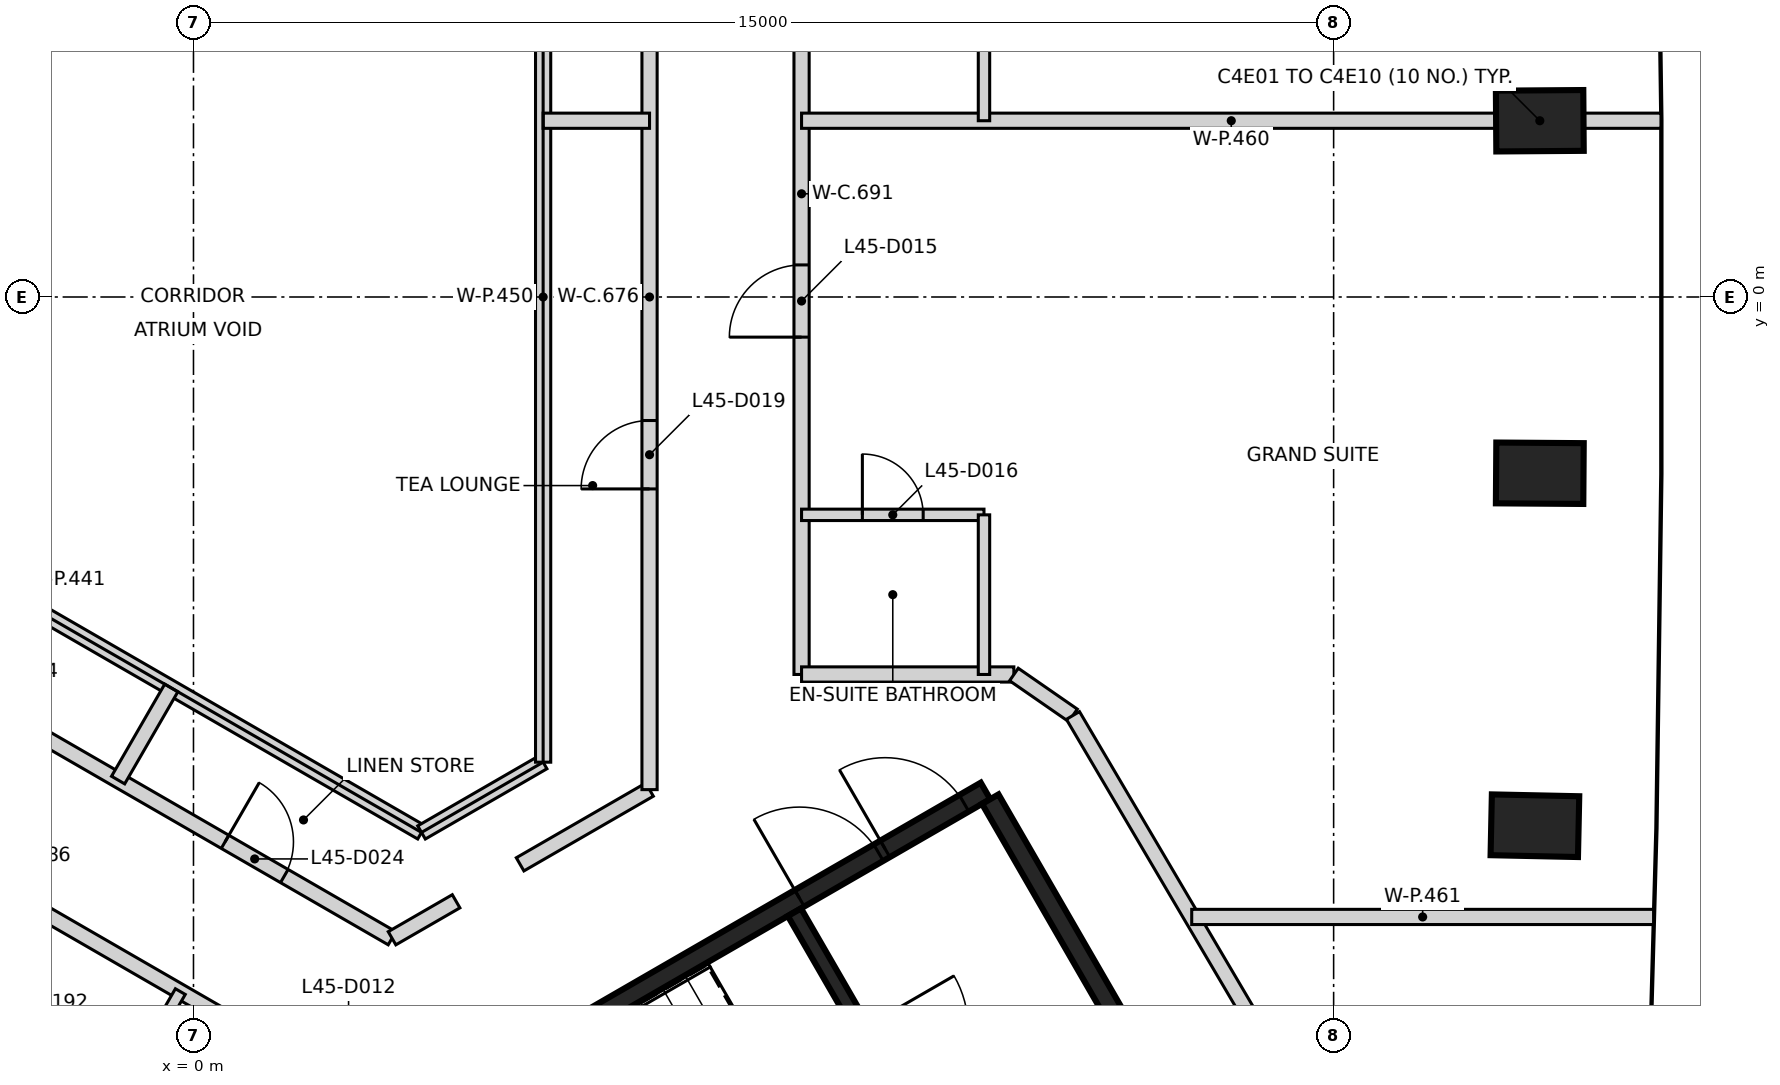
"""IFC4 building model, lengths in metres.
Left out: names, types, materials, properties, quantities, classifications, styles, units other than length and angle.
Written with IfcOpenShell. Run it as: python <this file> out.ifc"""

import sys

from ifc_helpers import new_model, si_unit, direction, frame, frame_2d, origin, origin_2d, place, context, subcontext, project, spatial, rectangle, extrude, element, fill, save


model = new_model("IFC4")
c1 = context("Model", 3, precision=1e-05, world=origin(), true_north=direction((0.0, 1.0)))
c2 = subcontext(c1, "Body", "Model", "MODEL_VIEW")
j1 = project(units=[si_unit("LENGTHUNIT", "METRE"), si_unit("PLANEANGLEUNIT", "RADIAN")], contexts=[c1])
p1 = place(None, origin())
s1 = spatial("IfcSite", under=j1, at=p1, CompositionType="ELEMENT")
p2 = place(p1, origin())
s2 = spatial("IfcBuilding", under=s1, at=p2, CompositionType="ELEMENT")
p3 = place(p2, frame((0.0, 0.0, 182.8)))
s3 = spatial("IfcBuildingStorey", under=s2, at=p3, CompositionType="ELEMENT", Elevation=182.8)
for number, where, z_axis, x_axis in (
    (1, (17.648, -6.956, -0.35), (0.0, 0.0, 1.0), (-1.0, 0.021, 0.0)),
    (2, (17.712, -2.319, -0.35), (0.0, 0.0, 1.0), (-1.0, 0.007, 0.0)),
    (3, (17.712, 2.319, -0.35), (0.0, 0.0, 1.0), (1.0, 0.007, 0.0)),
):
    element("IfcColumn", number, at=place(p3, frame(where, z_axis=z_axis, x_axis=x_axis)), inside=s3, PredefinedType="COLUMN", context=c2, shape_type="SweptSolid", body=[
        extrude(rectangle(XDim=1.15, YDim=0.8, at=origin_2d()), origin(), (0.0, 0.0, 1.0), 3.6),
    ])
p4 = place(p3, frame((0.417, -12.273, 0.0), z_axis=(0.0, 0.0, 1.0), x_axis=(0.866021906294, 0.500006057782, 0.0)))
e4 = element("IfcWall", 4, at=p4, inside=s3, PredefinedType="SHEAR", context=c2, shape_type="SweptSolid", body=[
    extrude(rectangle(XDim=11.55, YDim=0.25, at=frame_2d((5.775, 0.0))), origin(), (0.0, 0.0, 1.0), 3.25),
])
p5 = place(p4, frame((10.025, 0.0, 0.0)))
e5 = element("IfcOpeningElement", 5, at=p5, cuts=e4, PredefinedType="OPENING", context=c2, shape_type="SweptSolid", body=[
    extrude(rectangle(XDim=1.2, YDim=2.1, at=frame_2d((0.6, 1.05))), frame((0.0, 0.135, 0.0), z_axis=(0.0, -1.0, 0.0), x_axis=(1.0, 0.0, 0.0)), (0.0, 0.0, 1.0), 0.27),
])
p6 = place(p4, frame((8.725, 0.0, 0.0)))
e6 = element("IfcOpeningElement", 6, at=p6, cuts=e4, PredefinedType="OPENING", context=c2, shape_type="SweptSolid", body=[
    extrude(rectangle(XDim=1.2, YDim=2.1, at=frame_2d((0.6, 1.05))), frame((0.0, 0.135, 0.0), z_axis=(0.0, -1.0, 0.0), x_axis=(1.0, 0.0, 0.0)), (0.0, 0.0, 1.0), 0.27),
])
p7 = place(p3, frame((10.483, -6.606, 0.0), z_axis=(0.0, 0.0, 1.0), x_axis=(0.49999885962, -0.866026062182, 0.0)))
e7 = element("IfcWall", 7, at=p7, inside=s3, PredefinedType="SHEAR", context=c2, shape_type="SweptSolid", body=[
    extrude(rectangle(XDim=5.225, YDim=0.25, at=frame_2d((2.612, 0.0))), origin(), (0.0, 0.0, 1.0), 3.25),
])
p8 = place(p3, frame((7.906, -8.094, 0.0), z_axis=(0.0, 0.0, 1.0), x_axis=(0.500027839223, -0.866009330205, 0.0)))
e8 = element("IfcWall", 8, at=p8, inside=s3, PredefinedType="SHEAR", context=c2, shape_type="SweptSolid", body=[
    extrude(rectangle(XDim=5.098, YDim=0.2, at=frame_2d((2.549, 0.0))), origin(), (0.0, 0.0, 1.0), 3.25),
])
p9 = place(p8, frame((1.774, 0.0, 0.0)))
e9 = element("IfcOpeningElement", 9, at=p9, cuts=e8, PredefinedType="OPENING", context=c2, shape_type="SweptSolid", body=[
    extrude(rectangle(XDim=1.4, YDim=2.1, at=frame_2d((0.7, 1.05))), frame((0.0, 0.11, 0.0), z_axis=(0.0, -1.0, 0.0), x_axis=(1.0, 0.0, 0.0)), (0.0, 0.0, 1.0), 0.22),
])
p10 = place(p3, frame((-10.652, 3.087, 0.0), z_axis=(0.0, 0.0, 1.0), x_axis=(0.866016136997, 0.500016050204, 0.0)))
e10 = element("IfcWall", 10, at=p10, inside=s3, PredefinedType="PARTITIONING", context=c2, shape_type="SweptSolid", body=[
    extrude(rectangle(XDim=12.645, YDim=0.2, at=frame_2d((6.322, 0.0))), origin(), (0.0, 0.0, 1.0), 3.25),
])
p11 = place(p10, frame((10.817, 0.0, 0.0)))
e11 = element("IfcOpeningElement", 11, at=p11, cuts=e10, PredefinedType="OPENING", context=c2, shape_type="SweptSolid", body=[
    extrude(rectangle(XDim=1.0, YDim=2.1, at=frame_2d((0.5, 1.05))), frame((0.0, 0.11, 0.0), z_axis=(0.0, -1.0, 0.0), x_axis=(1.0, 0.0, 0.0)), (0.0, 0.0, 1.0), 0.22),
])
p12 = place(p10, frame((7.182, 0.0, 0.0)))
e12 = element("IfcOpeningElement", 12, at=p12, cuts=e10, PredefinedType="OPENING", context=c2, shape_type="SweptSolid", body=[
    extrude(rectangle(XDim=1.0, YDim=2.1, at=frame_2d((0.5, 1.05))), frame((0.0, 0.11, 0.0), z_axis=(0.0, -1.0, 0.0), x_axis=(1.0, 0.0, 0.0)), (0.0, 0.0, 1.0), 0.22),
])
p13 = place(p10, frame((2.153, 0.0, 0.0)))
e13 = element("IfcOpeningElement", 13, at=p13, cuts=e10, PredefinedType="OPENING", context=c2, shape_type="SweptSolid", body=[
    extrude(rectangle(XDim=1.0, YDim=2.1, at=frame_2d((0.5, 1.05))), frame((0.0, 0.11, 0.0), z_axis=(0.0, -1.0, 0.0), x_axis=(1.0, 0.0, 0.0)), (0.0, 0.0, 1.0), 0.22),
])
p14 = place(p3, frame((-8.612, 1.956, 0.0), z_axis=(0.0, 0.0, 1.0), x_axis=(0.866034386606, 0.499984440973, 0.0)))
e14 = element("IfcWall", 14, at=p14, inside=s3, PredefinedType="PARTITIONING", context=c2, shape_type="SweptSolid", body=[
    extrude(rectangle(XDim=12.96, YDim=0.2, at=frame_2d((6.48, 0.0))), origin(), (0.0, 0.0, 1.0), 3.25),
])
p15 = place(p14, frame((8.105, 0.0, 0.0)))
e15 = element("IfcOpeningElement", 15, at=p15, cuts=e14, PredefinedType="OPENING", context=c2, shape_type="SweptSolid", body=[
    extrude(rectangle(XDim=0.9, YDim=2.1, at=frame_2d((0.45, 1.05))), frame((0.0, 0.11, 0.0), z_axis=(0.0, -1.0, 0.0), x_axis=(1.0, 0.0, 0.0)), (0.0, 0.0, 1.0), 0.22),
])
p16 = place(p14, frame((1.637, 0.0, 0.0)))
e16 = element("IfcOpeningElement", 16, at=p16, cuts=e14, PredefinedType="OPENING", context=c2, shape_type="SweptSolid", body=[
    extrude(rectangle(XDim=0.9, YDim=2.1, at=frame_2d((0.45, 1.05))), frame((0.0, 0.11, 0.0), z_axis=(0.0, -1.0, 0.0), x_axis=(1.0, 0.0, 0.0)), (0.0, 0.0, 1.0), 0.22),
])
p17 = place(p3, frame((-8.612, -1.956, 0.0), z_axis=(0.0, 0.0, 1.0), x_axis=(0.866034386606, -0.499984440973, 0.0)))
e17 = element("IfcWall", 17, at=p17, inside=s3, PredefinedType="PARTITIONING", context=c2, shape_type="SweptSolid", body=[
    extrude(rectangle(XDim=12.96, YDim=0.2, at=frame_2d((6.48, 0.0))), origin(), (0.0, 0.0, 1.0), 3.25),
])
p18 = place(p17, frame((3.955, 0.0, 0.0)))
e18 = element("IfcOpeningElement", 18, at=p18, cuts=e17, PredefinedType="OPENING", context=c2, shape_type="SweptSolid", body=[
    extrude(rectangle(XDim=0.9, YDim=2.1, at=frame_2d((0.45, 1.05))), frame((0.0, 0.11, 0.0), z_axis=(0.0, -1.0, 0.0), x_axis=(1.0, 0.0, 0.0)), (0.0, 0.0, 1.0), 0.22),
])
p19 = place(p17, frame((10.424, 0.0, 0.0)))
e19 = element("IfcOpeningElement", 19, at=p19, cuts=e17, PredefinedType="OPENING", context=c2, shape_type="SweptSolid", body=[
    extrude(rectangle(XDim=0.9, YDim=2.1, at=frame_2d((0.45, 1.05))), frame((0.0, 0.11, 0.0), z_axis=(0.0, -1.0, 0.0), x_axis=(1.0, 0.0, 0.0)), (0.0, 0.0, 1.0), 0.22),
])
p20 = place(p3, frame((-8.301, -4.445, 0.0), z_axis=(0.0, 0.0, 1.0), x_axis=(0.865969859016, -0.500096194023, 0.0)))
e20 = element("IfcWall", 20, at=p20, inside=s3, PredefinedType="PARTITIONING", context=c2, shape_type="SweptSolid", body=[
    extrude(rectangle(XDim=12.647, YDim=0.2, at=frame_2d((6.323, 0.0))), origin(), (0.0, 0.0, 1.0), 3.25),
])
p21 = place(p20, frame((2.836, 0.0, 0.0)))
e21 = element("IfcOpeningElement", 21, at=p21, cuts=e20, PredefinedType="OPENING", context=c2, shape_type="SweptSolid", body=[
    extrude(rectangle(XDim=0.95, YDim=2.1, at=frame_2d((0.475, 1.05))), frame((0.0, 0.11, 0.0), z_axis=(0.0, -1.0, 0.0), x_axis=(1.0, 0.0, 0.0)), (0.0, 0.0, 1.0), 0.22),
])
p22 = place(p20, frame((11.467, 0.0, 0.0)))
e22 = element("IfcOpeningElement", 22, at=p22, cuts=e20, PredefinedType="OPENING", context=c2, shape_type="SweptSolid", body=[
    extrude(rectangle(XDim=0.95, YDim=2.1, at=frame_2d((0.475, 1.05))), frame((0.0, 0.11, 0.0), z_axis=(0.0, -1.0, 0.0), x_axis=(1.0, 0.0, 0.0)), (0.0, 0.0, 1.0), 0.22),
])
p23 = place(p3, frame((2.612, -8.437, 0.0), z_axis=(0.0, 0.0, 1.0), x_axis=(0.866026830048, 0.499997529631, 0.0)))
e23 = element("IfcWall", 23, at=p23, inside=s3, PredefinedType="PARTITIONING", context=c2, shape_type="SweptSolid", body=[
    extrude(rectangle(XDim=0.973, YDim=0.2, at=frame_2d((0.487, 0.0))), origin(), (0.0, 0.0, 1.0), 3.25),
])
p24 = place(p3, frame((4.297, -7.464, 0.0), z_axis=(0.0, 0.0, 1.0), x_axis=(0.866026378386, 0.499998311937, 0.0)))
e24 = element("IfcWall", 24, at=p24, inside=s3, PredefinedType="PARTITIONING", context=c2, shape_type="SweptSolid", body=[
    extrude(rectangle(XDim=1.966, YDim=0.2, at=frame_2d((0.983, 0.0))), origin(), (0.0, 0.0, 1.0), 3.25),
])
p25 = place(p3, frame((6.0, -6.481, 0.0), z_axis=(0.0, 0.0, 1.0), x_axis=(0.0, 1.0, 0.0)))
e25 = element("IfcWall", 25, at=p25, inside=s3, PredefinedType="PARTITIONING", context=c2, shape_type="SweptSolid", body=[
    extrude(rectangle(XDim=12.962, YDim=0.2, at=frame_2d((6.481, 0.0))), origin(), (0.0, 0.0, 1.0), 3.25),
])
p26 = place(p25, frame((3.956, 0.0, 0.0)))
e26 = element("IfcOpeningElement", 26, at=p26, cuts=e25, PredefinedType="OPENING", context=c2, shape_type="SweptSolid", body=[
    extrude(rectangle(XDim=0.9, YDim=2.1, at=frame_2d((0.45, 1.05))), frame((0.0, 0.11, 0.0), z_axis=(0.0, -1.0, 0.0), x_axis=(1.0, 0.0, 0.0)), (0.0, 0.0, 1.0), 0.22),
])
p27 = place(p25, frame((10.425, 0.0, 0.0)))
e27 = element("IfcOpeningElement", 27, at=p27, cuts=e25, PredefinedType="OPENING", context=c2, shape_type="SweptSolid", body=[
    extrude(rectangle(XDim=0.9, YDim=2.1, at=frame_2d((0.45, 1.05))), frame((0.0, 0.11, 0.0), z_axis=(0.0, -1.0, 0.0), x_axis=(1.0, 0.0, 0.0)), (0.0, 0.0, 1.0), 0.22),
])
p28 = place(p3, frame((8.0, -4.966, 0.0), z_axis=(0.0, 0.0, 1.0), x_axis=(0.0, 1.0, 0.0)))
e28 = element("IfcWall", 28, at=p28, inside=s3, PredefinedType="PARTITIONING", context=c2, shape_type="SweptSolid", body=[
    extrude(rectangle(XDim=12.647, YDim=0.2, at=frame_2d((6.324, 0.0))), origin(), (0.0, 0.0, 1.0), 3.25),
])
p29 = place(p28, frame((4.438, 0.0, 0.0)))
e29 = element("IfcOpeningElement", 29, at=p29, cuts=e28, PredefinedType="OPENING", context=c2, shape_type="SweptSolid", body=[
    extrude(rectangle(XDim=0.95, YDim=2.1, at=frame_2d((0.475, 1.05))), frame((0.0, 0.11, 0.0), z_axis=(0.0, -1.0, 0.0), x_axis=(1.0, 0.0, 0.0)), (0.0, 0.0, 1.0), 0.22),
])
p30 = place(p28, frame((11.466, 0.0, 0.0)))
e30 = element("IfcOpeningElement", 30, at=p30, cuts=e28, PredefinedType="OPENING", context=c2, shape_type="SweptSolid", body=[
    extrude(rectangle(XDim=0.95, YDim=2.1, at=frame_2d((0.475, 1.05))), frame((0.0, 0.11, 0.0), z_axis=(0.0, -1.0, 0.0), x_axis=(1.0, 0.0, 0.0)), (0.0, 0.0, 1.0), 0.22),
])
p31 = place(p3, frame((8.0, -4.966, 0.0), z_axis=(0.0, 0.0, 1.0), x_axis=(1.0, 0.0, 0.0)))
e31 = element("IfcWall", 31, at=p31, inside=s3, PredefinedType="PARTITIONING", context=c2, shape_type="SweptSolid", body=[
    extrude(rectangle(XDim=2.793, YDim=0.2, at=frame_2d((1.396, 0.0))), origin(), (0.0, 0.0, 1.0), 3.25),
])
p32 = place(p3, frame((10.794, -4.966, 0.0), z_axis=(0.0, 0.0, 1.0), x_axis=(0.822266583859, -0.569102508401, 0.0)))
e32 = element("IfcWall", 32, at=p32, inside=s3, PredefinedType="PARTITIONING", context=c2, shape_type="SweptSolid", body=[
    extrude(rectangle(XDim=0.945, YDim=0.2, at=frame_2d((0.473, 0.0))), origin(), (0.0, 0.0, 1.0), 3.25),
])
p33 = place(p3, frame((11.571, -5.505, 0.0), z_axis=(0.0, 0.0, 1.0), x_axis=(0.507311705706, -0.861762631618, 0.0)))
e33 = element("IfcWall", 33, at=p33, inside=s3, PredefinedType="PARTITIONING", context=c2, shape_type="SweptSolid", body=[
    extrude(rectangle(XDim=10.391, YDim=0.2, at=frame_2d((5.196, 0.0))), origin(), (0.0, 0.0, 1.0), 3.25),
])
p34 = place(p33, frame((6.228, 0.0, 0.0)))
e34 = element("IfcOpeningElement", 34, at=p34, cuts=e33, PredefinedType="OPENING", context=c2, shape_type="SweptSolid", body=[
    extrude(rectangle(XDim=1.0, YDim=2.1, at=frame_2d((0.5, 1.05))), frame((0.0, 0.11, 0.0), z_axis=(0.0, -1.0, 0.0), x_axis=(1.0, 0.0, 0.0)), (0.0, 0.0, 1.0), 0.22),
])
for number, where, z_axis, x_axis in (
    (35, (-7.6, 0.924, 0.0), (0.0, 0.0, 1.0), (0.866, 0.5, 0.0)),
    (36, (-7.6, -0.924, 0.0), (0.0, 0.0, 1.0), (0.866, -0.5, 0.0)),
):
    element("IfcWall", number, at=place(p3, frame(where, z_axis=z_axis, x_axis=x_axis)), inside=s3, PredefinedType="PARTITIONING", context=c2, shape_type="SweptSolid", body=[
        extrude(rectangle(XDim=12.24, YDim=0.2, at=frame_2d((6.12, 0.0))), origin(), (0.0, 0.0, 1.0), 3.25),
    ])
p35 = place(p3, frame((-0.992, -6.355, 0.0), z_axis=(0.0, 0.0, 1.0), x_axis=(0.500059638837, 0.865990968548, 0.0)))
e37 = element("IfcWall", 37, at=p35, inside=s3, PredefinedType="PARTITIONING", context=c2, shape_type="SweptSolid", body=[
    extrude(rectangle(XDim=1.4, YDim=0.2, at=frame_2d((0.7, 0.0))), origin(), (0.0, 0.0, 1.0), 3.25),
])
p36 = place(p3, frame((3.0, -7.044, 0.0), z_axis=(0.0, 0.0, 1.0), x_axis=(0.865875248522, 0.500259986404, 0.0)))
e38 = element("IfcWall", 38, at=p36, inside=s3, PredefinedType="PARTITIONING", context=c2, shape_type="SweptSolid", body=[
    extrude(rectangle(XDim=1.848, YDim=0.2, at=frame_2d((0.924, 0.0))), origin(), (0.0, 0.0, 1.0), 3.25),
])
p37 = place(p3, frame((4.6, -6.12, 0.0), z_axis=(0.0, 0.0, 1.0), x_axis=(0.0, 1.0, 0.0)))
e39 = element("IfcWall", 39, at=p37, inside=s3, PredefinedType="PARTITIONING", context=c2, shape_type="SweptSolid", body=[
    extrude(rectangle(XDim=12.24, YDim=0.2, at=frame_2d((6.12, 0.0))), origin(), (0.0, 0.0, 1.0), 3.25),
])
p38 = place(p3, frame((4.6, 2.319, 0.0), z_axis=(0.0, 0.0, 1.0), x_axis=(1.0, 0.0, 0.0)))
e40 = element("IfcWall", 40, at=p38, inside=s3, PredefinedType="PARTITIONING", context=c2, shape_type="SweptSolid", body=[
    extrude(rectangle(XDim=1.4, YDim=0.2, at=frame_2d((0.7, 0.0))), origin(), (0.0, 0.0, 1.0), 3.25),
])
p39 = place(p3, frame((8.0, 2.319, 0.0), z_axis=(0.0, 0.0, 1.0), x_axis=(1.0, 0.0, 0.0)))
e41 = element("IfcWall", 41, at=p39, inside=s3, PredefinedType="PARTITIONING", context=c2, shape_type="SweptSolid", body=[
    extrude(rectangle(XDim=11.306, YDim=0.2, at=frame_2d((5.653, 0.0))), origin(), (0.0, 0.0, 1.0), 3.25),
])
p40 = place(p3, frame((13.133, -8.156, 0.0), z_axis=(0.0, 0.0, 1.0), x_axis=(1.0, 0.0, 0.0)))
e42 = element("IfcWall", 42, at=p40, inside=s3, PredefinedType="PARTITIONING", context=c2, shape_type="SweptSolid", body=[
    extrude(rectangle(XDim=6.076, YDim=0.2, at=frame_2d((3.038, 0.0))), origin(), (0.0, 0.0, 1.0), 2.35),
])
p41 = place(p3, frame((-5.011, -9.116, 0.0), z_axis=(0.0, 0.0, 1.0), x_axis=(0.866052994476, -0.499952208475, 0.0)))
e43 = element("IfcWall", 43, at=p41, inside=s3, PredefinedType="PARTITIONING", context=c2, shape_type="SweptSolid", body=[
    extrude(rectangle(XDim=4.201, YDim=0.15, at=frame_2d((2.1, 0.0))), origin(), (0.0, 0.0, 1.0), 3.25),
])
p42 = place(p3, frame((-1.373, -11.216, 0.0), z_axis=(0.0, 0.0, 1.0), x_axis=(0.500045362686, 0.865999212041, 0.0)))
e44 = element("IfcWall", 44, at=p42, inside=s3, PredefinedType="PARTITIONING", context=c2, shape_type="SweptSolid", body=[
    extrude(rectangle(XDim=2.4, YDim=0.15, at=frame_2d((1.2, 0.0))), origin(), (0.0, 0.0, 1.0), 3.25),
])
p43 = place(p42, frame((0.8, 0.0, 0.0)))
e45 = element("IfcOpeningElement", 45, at=p43, cuts=e44, PredefinedType="OPENING", context=c2, shape_type="SweptSolid", body=[
    extrude(rectangle(XDim=0.8, YDim=2.1, at=frame_2d((0.4, 1.05))), frame((0.0, 0.085, 0.0), z_axis=(0.0, -1.0, 0.0), x_axis=(1.0, 0.0, 0.0)), (0.0, 0.0, 1.0), 0.17),
])
p44 = place(p3, frame((8.0, -2.866, 0.0), z_axis=(0.0, 0.0, 1.0), x_axis=(1.0, 0.0, 0.0)))
e46 = element("IfcWall", 46, at=p44, inside=s3, PredefinedType="PARTITIONING", context=c2, shape_type="SweptSolid", body=[
    extrude(rectangle(XDim=2.4, YDim=0.15, at=frame_2d((1.2, 0.0))), origin(), (0.0, 0.0, 1.0), 3.25),
])
p45 = place(p44, frame((0.8, 0.0, 0.0)))
e47 = element("IfcOpeningElement", 47, at=p45, cuts=e46, PredefinedType="OPENING", context=c2, shape_type="SweptSolid", body=[
    extrude(rectangle(XDim=0.8, YDim=2.1, at=frame_2d((0.4, 1.05))), frame((0.0, 0.085, 0.0), z_axis=(0.0, -1.0, 0.0), x_axis=(1.0, 0.0, 0.0)), (0.0, 0.0, 1.0), 0.17),
])
p46 = place(p3, frame((10.4, -4.966, 0.0), z_axis=(0.0, 0.0, 1.0), x_axis=(0.0, 1.0, 0.0)))
e48 = element("IfcWall", 48, at=p46, inside=s3, PredefinedType="PARTITIONING", context=c2, shape_type="SweptSolid", body=[
    extrude(rectangle(XDim=2.1, YDim=0.15, at=frame_2d((1.05, 0.0))), origin(), (0.0, 0.0, 1.0), 3.25),
])
p47 = place(p3, frame((10.4, 2.319, 0.0), z_axis=(0.0, 0.0, 1.0), x_axis=(0.0, 1.0, 0.0)))
e49 = element("IfcWall", 49, at=p47, inside=s3, PredefinedType="PARTITIONING", context=c2, shape_type="SweptSolid", body=[
    extrude(rectangle(XDim=2.1, YDim=0.15, at=frame_2d((1.05, 0.0))), origin(), (0.0, 0.0, 1.0), 3.25),
])
p48 = place(p5, origin())
e50 = element("IfcDoor", 50, at=p48, inside=s3, OperationType="SINGLE_SWING_LEFT", PredefinedType="DOOR", context=c2, shape_type="SweptSolid", body=[
    extrude(rectangle(XDim=1.2, YDim=2.1, at=frame_2d((0.6, 1.05))), frame((0.0, 0.025, 0.0), z_axis=(0.0, -1.0, 0.0), x_axis=(1.0, 0.0, 0.0)), (0.0, 0.0, 1.0), 0.05),
])
fill(e5, e50)
p49 = place(p6, origin())
e51 = element("IfcDoor", 51, at=p49, inside=s3, OperationType="SINGLE_SWING_RIGHT", PredefinedType="DOOR", context=c2, shape_type="SweptSolid", body=[
    extrude(rectangle(XDim=1.2, YDim=2.1, at=frame_2d((0.6, 1.05))), frame((0.0, 0.025, 0.0), z_axis=(0.0, -1.0, 0.0), x_axis=(1.0, 0.0, 0.0)), (0.0, 0.0, 1.0), 0.05),
])
fill(e6, e51)
p50 = place(p29, frame((0.95, 0.0, 0.0), z_axis=(0.0, 0.0, 1.0), x_axis=(-1.0, 0.0, 0.0)))
e52 = element("IfcDoor", 52, at=p50, inside=s3, OperationType="SINGLE_SWING_LEFT", PredefinedType="DOOR", context=c2, shape_type="SweptSolid", body=[
    extrude(rectangle(XDim=0.95, YDim=2.1, at=frame_2d((0.475, 1.05))), frame((0.0, 0.025, 0.0), z_axis=(0.0, -1.0, 0.0), x_axis=(1.0, 0.0, 0.0)), (0.0, 0.0, 1.0), 0.05),
])
fill(e29, e52)
p51 = place(p45, frame((0.8, 0.0, 0.0), z_axis=(0.0, 0.0, 1.0), x_axis=(-1.0, 0.0, 0.0)))
e53 = element("IfcDoor", 53, at=p51, inside=s3, OperationType="SINGLE_SWING_LEFT", PredefinedType="DOOR", context=c2, shape_type="SweptSolid", body=[
    extrude(rectangle(XDim=0.8, YDim=2.1, at=frame_2d((0.4, 1.05))), frame((0.0, 0.025, 0.0), z_axis=(0.0, -1.0, 0.0), x_axis=(1.0, 0.0, 0.0)), (0.0, 0.0, 1.0), 0.05),
])
fill(e47, e53)
p52 = place(p26, origin())
e54 = element("IfcDoor", 54, at=p52, inside=s3, OperationType="SINGLE_SWING_LEFT", PredefinedType="DOOR", context=c2, shape_type="SweptSolid", body=[
    extrude(rectangle(XDim=0.9, YDim=2.1, at=frame_2d((0.45, 1.05))), frame((0.0, 0.025, 0.0), z_axis=(0.0, -1.0, 0.0), x_axis=(1.0, 0.0, 0.0)), (0.0, 0.0, 1.0), 0.05),
])
fill(e26, e54)
p53 = place(p19, origin())
e55 = element("IfcDoor", 55, at=p53, inside=s3, OperationType="SINGLE_SWING_LEFT", PredefinedType="DOOR", context=c2, shape_type="SweptSolid", body=[
    extrude(rectangle(XDim=0.9, YDim=2.1, at=frame_2d((0.45, 1.05))), frame((0.0, 0.025, 0.0), z_axis=(0.0, -1.0, 0.0), x_axis=(1.0, 0.0, 0.0)), (0.0, 0.0, 1.0), 0.05),
])
fill(e19, e55)
save(model, sys.argv[1])
